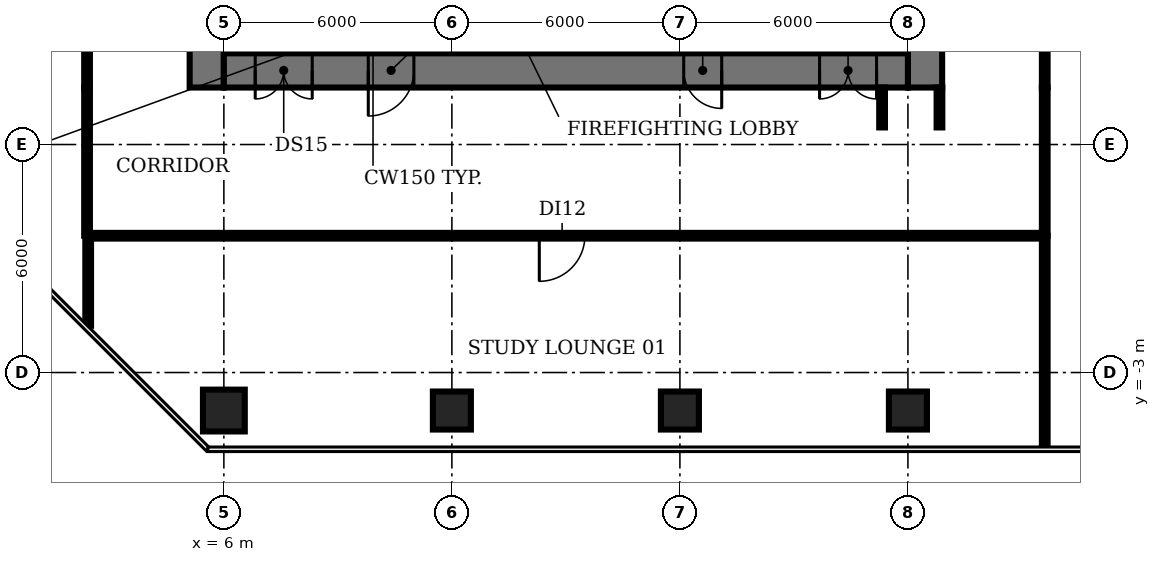
"""IFC4 building model, lengths in metres.
Left out: names, types, materials, properties, quantities, classifications, styles, units other than length and angle.
Written with IfcOpenShell. Run it as: python <this file> out.ifc"""

import sys

from ifc_helpers import new_model, si_unit, direction, frame, frame_2d, origin, origin_2d, place, context, subcontext, project, spatial, rectangle, circle, extrude, element, fill, save


model = new_model("IFC4")
c1 = context("Model", 3, precision=1e-05, world=origin(), true_north=direction((0.0, 1.0)))
c2 = subcontext(c1, "Body", "Model", "MODEL_VIEW")
j1 = project(units=[si_unit("LENGTHUNIT", "METRE"), si_unit("PLANEANGLEUNIT", "RADIAN")], contexts=[c1])
p1 = place(None, origin())
s1 = spatial("IfcSite", under=j1, at=p1, CompositionType="ELEMENT")
p2 = place(p1, origin())
s2 = spatial("IfcBuilding", under=s1, at=p2, CompositionType="ELEMENT")
p3 = place(p2, frame((0.0, 0.0, 20.0)))
s3 = spatial("IfcBuildingStorey", under=s2, at=p3, CompositionType="ELEMENT", Elevation=20.0)
p4 = place(p3, frame((6.0, -4.0, 0.0), z_axis=(0.0, 0.0, 1.0), x_axis=(1.0, 0.0, 0.0)))
e1 = element("IfcColumn", 1, at=p4, inside=s3, PredefinedType="COLUMN", context=c2, shape_type="SweptSolid", body=[
    extrude(circle(Radius=0.55, at=origin_2d()), origin(), (0.0, 0.0, 1.0), 4.15),
])
for number, where, z_axis, x_axis in (
    (2, (12.0, -4.0, 0.0), (0.0, 0.0, 1.0), (1.0, 0.0, 0.0)),
    (3, (18.0, -4.0, 0.0), (0.0, 0.0, 1.0), (1.0, 0.0, 0.0)),
    (4, (24.0, -4.0, 0.0), (0.0, 0.0, 1.0), (1.0, 0.0, 0.0)),
):
    element("IfcColumn", number, at=place(p3, frame(where, z_axis=z_axis, x_axis=x_axis)), inside=s3, PredefinedType="COLUMN", context=c2, shape_type="SweptSolid", body=[
        extrude(rectangle(XDim=1.0, YDim=1.0, at=origin_2d()), origin(), (0.0, 0.0, 1.0), 4.15),
    ])
p5 = place(p3, frame((9.275, 11.825, 0.0), z_axis=(0.0, 0.0, 1.0), x_axis=(0.0, -1.0, 0.0)))
e5 = element("IfcWall", 5, at=p5, inside=s3, PredefinedType="SHEAR", context=c2, shape_type="SweptSolid", body=[
    extrude(rectangle(XDim=6.425, YDim=0.25, at=frame_2d((3.212, 0.0))), origin(), (0.0, 0.0, 1.0), 4.15),
])
p6 = place(p5, frame((5.075, 0.0, 0.0)))
e6 = element("IfcOpeningElement", 6, at=p6, cuts=e5, PredefinedType="OPENING", context=c2, shape_type="SweptSolid", body=[
    extrude(rectangle(XDim=1.0, YDim=2.1, at=frame_2d((0.5, 1.05))), frame((0.0, 0.135, 0.0), z_axis=(0.0, -1.0, 0.0), x_axis=(1.0, 0.0, 0.0)), (0.0, 0.0, 1.0), 0.27),
])
p7 = place(p3, frame((13.5, 5.4, 0.0), z_axis=(0.0, 0.0, 1.0), x_axis=(0.0, 1.0, 0.0)))
e7 = element("IfcWall", 7, at=p7, inside=s3, PredefinedType="SHEAR", context=c2, shape_type="SweptSolid", body=[
    extrude(rectangle(XDim=8.2, YDim=0.2, at=frame_2d((4.1, 0.0))), origin(), (0.0, 0.0, 1.0), 4.15),
])
p8 = place(p7, frame((0.75, 0.0, 0.0)))
e8 = element("IfcOpeningElement", 8, at=p8, cuts=e7, PredefinedType="OPENING", context=c2, shape_type="SweptSolid", body=[
    extrude(rectangle(XDim=1.1, YDim=2.1, at=frame_2d((0.55, 1.05))), frame((0.0, 0.11, 0.0), z_axis=(0.0, -1.0, 0.0), x_axis=(1.0, 0.0, 0.0)), (0.0, 0.0, 1.0), 0.22),
])
p9 = place(p7, frame((3.55, 0.0, 0.0)))
e9 = element("IfcOpeningElement", 9, at=p9, cuts=e7, PredefinedType="OPENING", context=c2, shape_type="SweptSolid", body=[
    extrude(rectangle(XDim=1.1, YDim=2.1, at=frame_2d((0.55, 1.05))), frame((0.0, 0.11, 0.0), z_axis=(0.0, -1.0, 0.0), x_axis=(1.0, 0.0, 0.0)), (0.0, 0.0, 1.0), 0.22),
])
p10 = place(p7, frame((6.35, 0.0, 0.0)))
e10 = element("IfcOpeningElement", 10, at=p10, cuts=e7, PredefinedType="OPENING", context=c2, shape_type="SweptSolid", body=[
    extrude(rectangle(XDim=1.1, YDim=2.1, at=frame_2d((0.55, 1.05))), frame((0.0, 0.11, 0.0), z_axis=(0.0, -1.0, 0.0), x_axis=(1.0, 0.0, 0.0)), (0.0, 0.0, 1.0), 0.22),
])
p11 = place(p3, frame((16.5, 5.4, 0.0), z_axis=(0.0, 0.0, 1.0), x_axis=(0.0, 1.0, 0.0)))
e11 = element("IfcWall", 11, at=p11, inside=s3, PredefinedType="SHEAR", context=c2, shape_type="SweptSolid", body=[
    extrude(rectangle(XDim=8.2, YDim=0.2, at=frame_2d((4.1, 0.0))), origin(), (0.0, 0.0, 1.0), 4.15),
])
p12 = place(p3, frame((20.725, 5.4, 0.0), z_axis=(0.0, 0.0, 1.0), x_axis=(0.0, 1.0, 0.0)))
e12 = element("IfcWall", 12, at=p12, inside=s3, PredefinedType="SHEAR", context=c2, shape_type="SweptSolid", body=[
    extrude(rectangle(XDim=6.3, YDim=0.25, at=frame_2d((3.15, 0.0))), origin(), (0.0, 0.0, 1.0), 4.15),
])
p13 = place(p3, frame((5.55, 4.5, 0.0), z_axis=(0.0, 0.0, 1.0), x_axis=(0.0, 1.0, 0.0)))
e13 = element("IfcWall", 13, at=p13, inside=s3, PredefinedType="SHEAR", context=c2, shape_type="SweptSolid", body=[
    extrude(rectangle(XDim=21.2, YDim=0.9, at=frame_2d((10.6, 0.0))), origin(), (0.0, 0.0, 1.0), 4.15),
])
p14 = place(p13, frame((7.6, 0.0, 0.0)))
e14 = element("IfcOpeningElement", 14, at=p14, cuts=e13, PredefinedType="OPENING", context=c2, shape_type="SweptSolid", body=[
    extrude(rectangle(XDim=1.2, YDim=2.1, at=frame_2d((0.6, 1.05))), frame((0.0, 0.46, 0.0), z_axis=(0.0, -1.0, 0.0), x_axis=(1.0, 0.0, 0.0)), (0.0, 0.0, 1.0), 0.92),
])
p15 = place(p13, frame((14.15, 0.0, 0.0)))
e15 = element("IfcOpeningElement", 15, at=p15, cuts=e13, PredefinedType="OPENING", context=c2, shape_type="SweptSolid", body=[
    extrude(rectangle(XDim=1.2, YDim=2.1, at=frame_2d((0.6, 1.05))), frame((0.0, 0.46, 0.0), z_axis=(0.0, -1.0, 0.0), x_axis=(1.0, 0.0, 0.0)), (0.0, 0.0, 1.0), 0.92),
])
p16 = place(p3, frame((24.45, 25.7, 0.0), z_axis=(0.0, 0.0, 1.0), x_axis=(0.0, -1.0, 0.0)))
e16 = element("IfcWall", 16, at=p16, inside=s3, PredefinedType="SHEAR", context=c2, shape_type="SweptSolid", body=[
    extrude(rectangle(XDim=21.2, YDim=0.9, at=frame_2d((10.6, 0.0))), origin(), (0.0, 0.0, 1.0), 4.15),
])
p17 = place(p16, frame((12.45, 0.0, 0.0)))
e17 = element("IfcOpeningElement", 17, at=p17, cuts=e16, PredefinedType="OPENING", context=c2, shape_type="SweptSolid", body=[
    extrude(rectangle(XDim=0.9, YDim=2.1, at=frame_2d((0.45, 1.05))), frame((0.0, 0.46, 0.0), z_axis=(0.0, -1.0, 0.0), x_axis=(1.0, 0.0, 0.0)), (0.0, 0.0, 1.0), 0.92),
])
p18 = place(p16, frame((6.45, 0.0, 0.0)))
e18 = element("IfcOpeningElement", 18, at=p18, cuts=e16, PredefinedType="OPENING", context=c2, shape_type="SweptSolid", body=[
    extrude(rectangle(XDim=2.0, YDim=2.1, at=frame_2d((1.0, 1.05))), frame((0.0, 0.46, 0.0), z_axis=(0.0, -1.0, 0.0), x_axis=(1.0, 0.0, 0.0)), (0.0, 0.0, 1.0), 0.92),
])
p19 = place(p3, frame((24.0, 4.95, 0.0), z_axis=(0.0, 0.0, 1.0), x_axis=(-1.0, 0.0, 0.0)))
e19 = element("IfcWall", 19, at=p19, inside=s3, PredefinedType="SHEAR", context=c2, shape_type="SweptSolid", body=[
    extrude(rectangle(XDim=18.0, YDim=0.9, at=frame_2d((9.0, 0.0))), origin(), (0.0, 0.0, 1.0), 4.15),
])
p20 = place(p19, frame((15.675, 0.0, 0.0)))
e20 = element("IfcOpeningElement", 20, at=p20, cuts=e19, PredefinedType="OPENING", context=c2, shape_type="SweptSolid", body=[
    extrude(rectangle(XDim=1.5, YDim=2.1, at=frame_2d((0.75, 1.05))), frame((0.0, 0.46, 0.0), z_axis=(0.0, -1.0, 0.0), x_axis=(1.0, 0.0, 0.0)), (0.0, 0.0, 1.0), 0.92),
])
p21 = place(p19, frame((0.825, 0.0, 0.0)))
e21 = element("IfcOpeningElement", 21, at=p21, cuts=e19, PredefinedType="OPENING", context=c2, shape_type="SweptSolid", body=[
    extrude(rectangle(XDim=1.5, YDim=2.1, at=frame_2d((0.75, 1.05))), frame((0.0, 0.46, 0.0), z_axis=(0.0, -1.0, 0.0), x_axis=(1.0, 0.0, 0.0)), (0.0, 0.0, 1.0), 0.92),
])
p22 = place(p19, frame((13.0, 0.0, 0.0)))
e22 = element("IfcOpeningElement", 22, at=p22, cuts=e19, PredefinedType="OPENING", context=c2, shape_type="SweptSolid", body=[
    extrude(rectangle(XDim=1.2, YDim=2.1, at=frame_2d((0.6, 1.05))), frame((0.0, 0.46, 0.0), z_axis=(0.0, -1.0, 0.0), x_axis=(1.0, 0.0, 0.0)), (0.0, 0.0, 1.0), 0.92),
])
p23 = place(p19, frame((4.9, 0.0, 0.0)))
e23 = element("IfcOpeningElement", 23, at=p23, cuts=e19, PredefinedType="OPENING", context=c2, shape_type="SweptSolid", body=[
    extrude(rectangle(XDim=1.0, YDim=2.1, at=frame_2d((0.5, 1.05))), frame((0.0, 0.46, 0.0), z_axis=(0.0, -1.0, 0.0), x_axis=(1.0, 0.0, 0.0)), (0.0, 0.0, 1.0), 0.92),
])
p24 = place(p3, frame((2.4, 0.6, 0.0), z_axis=(0.0, 0.0, 1.0), x_axis=(0.0, 1.0, 0.0)))
e24 = element("IfcWall", 24, at=p24, inside=s3, PredefinedType="PARTITIONING", context=c2, shape_type="SweptSolid", body=[
    extrude(rectangle(XDim=3.9, YDim=0.15, at=frame_2d((1.95, 0.0))), origin(), (0.0, 0.0, 1.0), 3.08),
])
p25 = place(p3, frame((2.4, 4.5, 0.0), z_axis=(0.0, 0.0, 1.0), x_axis=(0.0, 1.0, 0.0)))
e25 = element("IfcWall", 25, at=p25, inside=s3, PredefinedType="PARTITIONING", context=c2, shape_type="SweptSolid", body=[
    extrude(rectangle(XDim=21.2, YDim=0.15, at=frame_2d((10.6, 0.0))), origin(), (0.0, 0.0, 1.0), 3.08),
])
p26 = place(p25, frame((10.8, 0.0, 0.0)))
e26 = element("IfcOpeningElement", 26, at=p26, cuts=e25, PredefinedType="OPENING", context=c2, shape_type="SweptSolid", body=[
    extrude(rectangle(XDim=1.2, YDim=2.1, at=frame_2d((0.6, 1.05))), frame((0.0, 0.085, 0.0), z_axis=(0.0, -1.0, 0.0), x_axis=(1.0, 0.0, 0.0)), (0.0, 0.0, 1.0), 0.17),
])
p27 = place(p3, frame((2.43, -1.77, 0.0), z_axis=(0.0, 0.0, 1.0), x_axis=(0.0, 1.0, 0.0)))
e27 = element("IfcWall", 27, at=p27, inside=s3, PredefinedType="PARTITIONING", context=c2, shape_type="SweptSolid", body=[
    extrude(rectangle(XDim=2.37, YDim=0.15, at=frame_2d((1.185, 0.0))), origin(), (0.0, 0.0, 1.0), 3.08),
])
for number, where, z_axis, x_axis in (
    (28, (23.32, 3.45, 0.0), (0.0, 0.0, 1.0), (0.0, 1.0, 0.0)),
    (29, (24.83, 3.45, 0.0), (0.0, 0.0, 1.0), (0.0, 1.0, 0.0)),
):
    element("IfcWall", number, at=place(p3, frame(where, z_axis=z_axis, x_axis=x_axis)), inside=s3, PredefinedType="PARTITIONING", context=c2, shape_type="SweptSolid", body=[
        extrude(rectangle(XDim=1.05, YDim=0.15, at=frame_2d((0.525, 0.0))), origin(), (0.0, 0.0, 1.0), 3.08),
    ])
p28 = place(p3, frame((27.6, -4.97, 0.0), z_axis=(0.0, 0.0, 1.0), x_axis=(0.0, 1.0, 0.0)))
e30 = element("IfcWall", 30, at=p28, inside=s3, PredefinedType="PARTITIONING", context=c2, shape_type="SweptSolid", body=[
    extrude(rectangle(XDim=5.57, YDim=0.15, at=frame_2d((2.785, 0.0))), origin(), (0.0, 0.0, 1.0), 3.08),
])
p29 = place(p3, frame((27.6, 0.6, 0.0), z_axis=(0.0, 0.0, 1.0), x_axis=(-1.0, 0.0, 0.0)))
e31 = element("IfcWall", 31, at=p29, inside=s3, PredefinedType="PARTITIONING", context=c2, shape_type="SweptSolid", body=[
    extrude(rectangle(XDim=25.2, YDim=0.15, at=frame_2d((12.6, 0.0))), origin(), (0.0, 0.0, 1.0), 3.08),
])
p30 = place(p29, frame((12.1, 0.0, 0.0)))
e32 = element("IfcOpeningElement", 32, at=p30, cuts=e31, PredefinedType="OPENING", context=c2, shape_type="SweptSolid", body=[
    extrude(rectangle(XDim=1.2, YDim=2.1, at=frame_2d((0.6, 1.05))), frame((0.0, 0.085, 0.0), z_axis=(0.0, -1.0, 0.0), x_axis=(1.0, 0.0, 0.0)), (0.0, 0.0, 1.0), 0.17),
])
p31 = place(p3, frame((27.6, 0.6, 0.0), z_axis=(0.0, 0.0, 1.0), x_axis=(0.0, 1.0, 0.0)))
e33 = element("IfcWall", 33, at=p31, inside=s3, PredefinedType="PARTITIONING", context=c2, shape_type="SweptSolid", body=[
    extrude(rectangle(XDim=3.9, YDim=0.15, at=frame_2d((1.95, 0.0))), origin(), (0.0, 0.0, 1.0), 3.08),
])
p32 = place(p3, frame((27.6, 23.77, 0.0), z_axis=(0.0, 0.0, 1.0), x_axis=(0.0, -1.0, 0.0)))
e34 = element("IfcWall", 34, at=p32, inside=s3, PredefinedType="PARTITIONING", context=c2, shape_type="SweptSolid", body=[
    extrude(rectangle(XDim=19.27, YDim=0.15, at=frame_2d((9.635, 0.0))), origin(), (0.0, 0.0, 1.0), 3.08),
])
p33 = place(p32, frame((9.07, 0.0, 0.0)))
e35 = element("IfcOpeningElement", 35, at=p33, cuts=e34, PredefinedType="OPENING", context=c2, shape_type="SweptSolid", body=[
    extrude(rectangle(XDim=1.0, YDim=2.1, at=frame_2d((0.5, 1.05))), frame((0.0, 0.085, 0.0), z_axis=(0.0, -1.0, 0.0), x_axis=(1.0, 0.0, 0.0)), (0.0, 0.0, 1.0), 0.17),
])
p34 = place(p20, origin())
e36 = element("IfcDoor", 36, at=p34, inside=s3, OperationType="DOUBLE_DOOR_SINGLE_SWING", PredefinedType="DOOR", context=c2, shape_type="SweptSolid", body=[
    extrude(rectangle(XDim=1.5, YDim=2.1, at=frame_2d((0.75, 1.05))), frame((0.0, 0.025, 0.0), z_axis=(0.0, -1.0, 0.0), x_axis=(1.0, 0.0, 0.0)), (0.0, 0.0, 1.0), 0.05),
])
fill(e20, e36)
p35 = place(p21, origin())
e37 = element("IfcDoor", 37, at=p35, inside=s3, OperationType="DOUBLE_DOOR_SINGLE_SWING", PredefinedType="DOOR", context=c2, shape_type="SweptSolid", body=[
    extrude(rectangle(XDim=1.5, YDim=2.1, at=frame_2d((0.75, 1.05))), frame((0.0, 0.025, 0.0), z_axis=(0.0, -1.0, 0.0), x_axis=(1.0, 0.0, 0.0)), (0.0, 0.0, 1.0), 0.05),
])
fill(e21, e37)
p36 = place(p22, origin())
e38 = element("IfcDoor", 38, at=p36, inside=s3, OperationType="SINGLE_SWING_RIGHT", PredefinedType="DOOR", context=c2, shape_type="SweptSolid", body=[
    extrude(rectangle(XDim=1.2, YDim=2.1, at=frame_2d((0.6, 1.05))), frame((0.0, 0.025, 0.0), z_axis=(0.0, -1.0, 0.0), x_axis=(1.0, 0.0, 0.0)), (0.0, 0.0, 1.0), 0.05),
])
fill(e22, e38)
p37 = place(p23, origin())
e39 = element("IfcDoor", 39, at=p37, inside=s3, OperationType="SINGLE_SWING_LEFT", PredefinedType="DOOR", context=c2, shape_type="SweptSolid", body=[
    extrude(rectangle(XDim=1.0, YDim=2.1, at=frame_2d((0.5, 1.05))), frame((0.0, -0.39, 0.0), z_axis=(0.0, -1.0, 0.0), x_axis=(1.0, 0.0, 0.0)), (0.0, 0.0, 1.0), 0.05),
])
fill(e23, e39)
p38 = place(p30, origin())
e40 = element("IfcDoor", 40, at=p38, inside=s3, OperationType="SINGLE_SWING_RIGHT", PredefinedType="DOOR", context=c2, shape_type="SweptSolid", body=[
    extrude(rectangle(XDim=1.2, YDim=2.1, at=frame_2d((0.6, 1.05))), frame((0.0, 0.025, 0.0), z_axis=(0.0, -1.0, 0.0), x_axis=(1.0, 0.0, 0.0)), (0.0, 0.0, 1.0), 0.05),
])
fill(e32, e40)
save(model, sys.argv[1])
